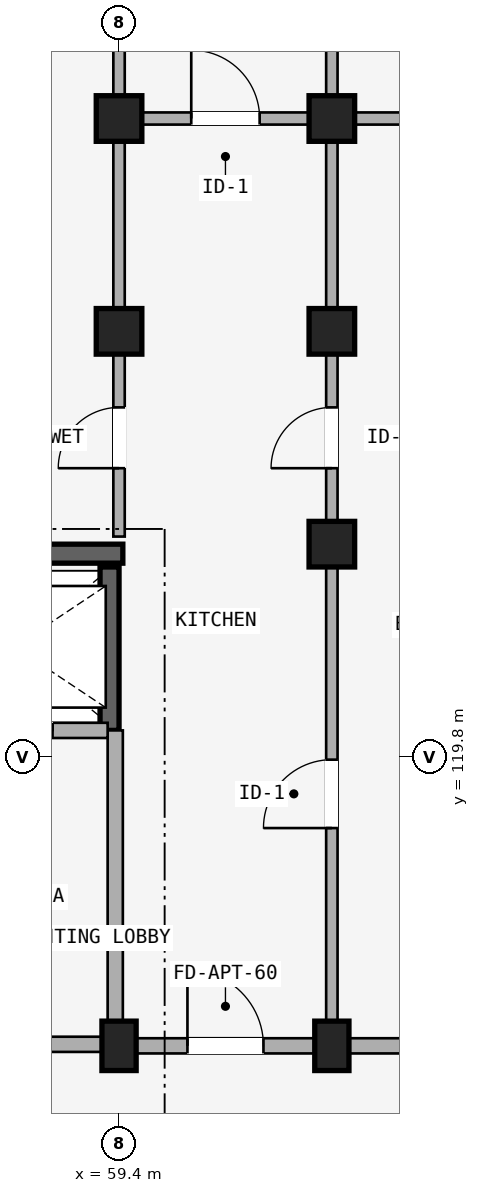
"""IFC4 building model, lengths in metres.
Left out: names, types, materials, properties, quantities, classifications, styles, units other than length and angle.
Written with IfcOpenShell. Run it as: python <this file> out.ifc"""

import sys

from ifc_helpers import new_model, si_unit, direction, frame, frame_2d, origin, origin_2d, place, context, subcontext, project, spatial, rectangle, extrude, element, fill, save


model = new_model("IFC4")
c1 = context("Model", 3, precision=1e-05, world=origin(), true_north=direction((0.0, 1.0)))
c2 = subcontext(c1, "Body", "Model", "MODEL_VIEW")
j1 = project(units=[si_unit("LENGTHUNIT", "METRE"), si_unit("PLANEANGLEUNIT", "RADIAN")], contexts=[c1])
p1 = place(None, origin())
s1 = spatial("IfcSite", under=j1, at=p1, CompositionType="ELEMENT")
p2 = place(p1, origin())
s2 = spatial("IfcBuilding", under=s1, at=p2, CompositionType="ELEMENT")
p3 = place(p2, frame((0.0, 0.0, 30.75)))
s3 = spatial("IfcBuildingStorey", under=s2, at=p3, CompositionType="ELEMENT", Elevation=30.75)
p4 = place(p3, frame((56.65, 122.475, 0.0), z_axis=(0.0, 0.0, 1.0), x_axis=(1.0, 0.0, 0.0)))
e1 = element("IfcWall", 1, at=p4, inside=s3, PredefinedType="SHEAR", context=c2, shape_type="SweptSolid", body=[
    extrude(rectangle(XDim=2.8, YDim=0.25, at=frame_2d((1.4, 0.0))), origin(), (0.0, 0.0, 1.0), 2.93),
])
p5 = place(p3, frame((59.275, 120.15, 0.0), z_axis=(0.0, 0.0, 1.0), x_axis=(0.0, 1.0, 0.0)))
e2 = element("IfcWall", 2, at=p5, inside=s3, PredefinedType="SHEAR", context=c2, shape_type="SweptSolid", body=[
    extrude(rectangle(XDim=2.15, YDim=0.25, at=frame_2d((1.075, 0.0))), origin(), (0.0, 0.0, 1.0), 2.93),
])
p6 = place(p3, frame((59.4, 116.0, 0.0), z_axis=(0.0, 0.0, 1.0), x_axis=(1.0, 0.0, 0.0)))
e3 = element("IfcColumn", 3, at=p6, inside=s3, PredefinedType="COLUMN", context=c2, shape_type="SweptSolid", body=[
    extrude(rectangle(XDim=0.45, YDim=0.65, at=origin_2d()), origin(), (0.0, 0.0, 1.0), 2.93),
])
for number, where, z_axis, x_axis in (
    (4, (59.4, 125.4, 0.0), (0.0, 0.0, 1.0), (1.0, 0.0, 0.0)),
    (5, (59.4, 128.2, 0.0), (0.0, 0.0, 1.0), (1.0, 0.0, 0.0)),
):
    element("IfcColumn", number, at=place(p3, frame(where, z_axis=z_axis, x_axis=x_axis)), inside=s3, PredefinedType="COLUMN", context=c2, shape_type="SweptSolid", body=[
        extrude(rectangle(XDim=0.6, YDim=0.6, at=origin_2d()), origin(), (0.0, 0.0, 1.0), 2.93),
    ])
p7 = place(p3, frame((62.2, 116.0, 0.0), z_axis=(0.0, 0.0, 1.0), x_axis=(1.0, 0.0, 0.0)))
e6 = element("IfcColumn", 6, at=p7, inside=s3, PredefinedType="COLUMN", context=c2, shape_type="SweptSolid", body=[
    extrude(rectangle(XDim=0.45, YDim=0.65, at=origin_2d()), origin(), (0.0, 0.0, 1.0), 2.93),
])
for number, where, z_axis, x_axis in (
    (7, (62.2, 122.6, 0.0), (0.0, 0.0, 1.0), (1.0, 0.0, 0.0)),
    (8, (62.2, 125.4, 0.0), (0.0, 0.0, 1.0), (1.0, 0.0, 0.0)),
    (9, (62.2, 128.2, 0.0), (0.0, 0.0, 1.0), (1.0, 0.0, 0.0)),
):
    element("IfcColumn", number, at=place(p3, frame(where, z_axis=z_axis, x_axis=x_axis)), inside=s3, PredefinedType="COLUMN", context=c2, shape_type="SweptSolid", body=[
        extrude(rectangle(XDim=0.6, YDim=0.6, at=origin_2d()), origin(), (0.0, 0.0, 1.0), 2.93),
    ])
p8 = place(p3, frame((53.7, 116.02, 0.0), z_axis=(0.0, 0.0, 1.0), x_axis=(1.0, 0.0, 0.0)))
e10 = element("IfcWall", 10, at=p8, inside=s3, PredefinedType="STANDARD", context=c2, shape_type="SweptSolid", body=[
    extrude(rectangle(XDim=5.65, YDim=0.2, at=frame_2d((2.825, 0.0))), origin(), (0.0, 0.0, 1.0), 2.372),
])
p9 = place(p8, frame((1.923, 0.0, 0.0)))
e11 = element("IfcOpeningElement", 11, at=p9, cuts=e10, PredefinedType="OPENING", context=c2, shape_type="SweptSolid", body=[
    extrude(rectangle(XDim=1.24, YDim=2.15, at=frame_2d((0.62, 1.075))), frame((0.0, 0.11, 0.0), z_axis=(0.0, -1.0, 0.0), x_axis=(1.0, 0.0, 0.0)), (0.0, 0.0, 1.0), 0.22),
])
p10 = place(p3, frame((59.35, 116.02, 0.0), z_axis=(0.0, 0.0, 1.0), x_axis=(0.0, 1.0, 0.0)))
e12 = element("IfcWall", 12, at=p10, inside=s3, PredefinedType="STANDARD", context=c2, shape_type="SweptSolid", body=[
    extrude(rectangle(XDim=4.13, YDim=0.2, at=frame_2d((2.065, 0.0))), origin(), (0.0, 0.0, 1.0), 2.372),
])
p11 = place(p3, frame((56.7, 120.15, 0.0), z_axis=(0.0, 0.0, 1.0), x_axis=(1.0, 0.0, 0.0)))
e13 = element("IfcWall", 13, at=p11, inside=s3, PredefinedType="STANDARD", context=c2, shape_type="SweptSolid", body=[
    extrude(rectangle(XDim=2.55, YDim=0.2, at=frame_2d((1.275, 0.0))), origin(), (0.0, 0.0, 1.0), 2.372),
])
p12 = place(p11, frame((0.725, 0.0, 0.0)))
e14 = element("IfcOpeningElement", 14, at=p12, cuts=e13, PredefinedType="OPENING", context=c2, shape_type="SweptSolid", body=[
    extrude(rectangle(XDim=1.1, YDim=2.15, at=frame_2d((0.55, 1.075))), frame((0.0, 0.11, 0.0), z_axis=(0.0, -1.0, 0.0), x_axis=(1.0, 0.0, 0.0)), (0.0, 0.0, 1.0), 0.22),
])
p13 = place(p3, frame((59.4, 116.0, 0.0), z_axis=(0.0, 0.0, 1.0), x_axis=(1.0, 0.0, 0.0)))
e15 = element("IfcWall", 15, at=p13, inside=s3, PredefinedType="STANDARD", context=c2, shape_type="SweptSolid", body=[
    extrude(rectangle(XDim=2.8, YDim=0.2, at=frame_2d((1.4, 0.0))), origin(), (0.0, 0.0, 1.0), 2.372),
])
p14 = place(p13, frame((0.9, 0.0, 0.0)))
e16 = element("IfcOpeningElement", 16, at=p14, cuts=e15, PredefinedType="OPENING", context=c2, shape_type="SweptSolid", body=[
    extrude(rectangle(XDim=1.0, YDim=2.15, at=frame_2d((0.5, 1.075))), frame((0.0, 0.11, 0.0), z_axis=(0.0, -1.0, 0.0), x_axis=(1.0, 0.0, 0.0)), (0.0, 0.0, 1.0), 0.22),
])
p15 = place(p3, frame((59.48, 128.2, 0.0), z_axis=(0.0, 0.0, 1.0), x_axis=(1.0, 0.0, 0.0)))
e17 = element("IfcWall", 17, at=p15, inside=s3, PredefinedType="PLUMBINGWALL", context=c2, shape_type="SweptSolid", body=[
    extrude(rectangle(XDim=2.64, YDim=0.16, at=frame_2d((1.32, 0.0))), origin(), (0.0, 0.0, 1.0), 2.372),
])
p16 = place(p15, frame((0.87, 0.0, 0.0)))
e18 = element("IfcOpeningElement", 18, at=p16, cuts=e17, PredefinedType="OPENING", context=c2, shape_type="SweptSolid", body=[
    extrude(rectangle(XDim=0.9, YDim=2.1, at=frame_2d((0.45, 1.05))), frame((0.0, 0.09, 0.0), z_axis=(0.0, -1.0, 0.0), x_axis=(1.0, 0.0, 0.0)), (0.0, 0.0, 1.0), 0.18),
])
p17 = place(p3, frame((62.2, 116.0, 0.0), z_axis=(0.0, 0.0, 1.0), x_axis=(1.0, 0.0, 0.0)))
e19 = element("IfcWall", 19, at=p17, inside=s3, PredefinedType="STANDARD", context=c2, shape_type="SweptSolid", body=[
    extrude(rectangle(XDim=2.8, YDim=0.2, at=frame_2d((1.4, 0.0))), origin(), (0.0, 0.0, 1.0), 2.372),
])
p18 = place(p3, frame((62.28, 128.2, 0.0), z_axis=(0.0, 0.0, 1.0), x_axis=(1.0, 0.0, 0.0)))
e20 = element("IfcWall", 20, at=p18, inside=s3, PredefinedType="PLUMBINGWALL", context=c2, shape_type="SweptSolid", body=[
    extrude(rectangle(XDim=2.64, YDim=0.16, at=frame_2d((1.32, 0.0))), origin(), (0.0, 0.0, 1.0), 2.372),
])
p19 = place(p18, frame((0.92, 0.0, 0.0)))
e21 = element("IfcOpeningElement", 21, at=p19, cuts=e20, PredefinedType="OPENING", context=c2, shape_type="SweptSolid", body=[
    extrude(rectangle(XDim=0.8, YDim=2.1, at=frame_2d((0.4, 1.05))), frame((0.0, 0.09, 0.0), z_axis=(0.0, -1.0, 0.0), x_axis=(1.0, 0.0, 0.0)), (0.0, 0.0, 1.0), 0.18),
])
p20 = place(p3, frame((59.4, 122.7, 0.0), z_axis=(0.0, 0.0, 1.0), x_axis=(0.0, 1.0, 0.0)))
e22 = element("IfcWall", 22, at=p20, inside=s3, PredefinedType="PARTITIONING", context=c2, shape_type="SweptSolid", body=[
    extrude(rectangle(XDim=10.82, YDim=0.15, at=frame_2d((5.41, 0.0))), origin(), (0.0, 0.0, 1.0), 2.372),
])
p21 = place(p20, frame((0.899, 0.0, 0.0)))
e23 = element("IfcOpeningElement", 23, at=p21, cuts=e22, PredefinedType="OPENING", context=c2, shape_type="SweptSolid", body=[
    extrude(rectangle(XDim=0.8, YDim=2.1, at=frame_2d((0.4, 1.05))), frame((0.0, 0.085, 0.0), z_axis=(0.0, -1.0, 0.0), x_axis=(1.0, 0.0, 0.0)), (0.0, 0.0, 1.0), 0.17),
])
p22 = place(p3, frame((62.2, 116.05, 0.0), z_axis=(0.0, 0.0, 1.0), x_axis=(0.0, 1.0, 0.0)))
e24 = element("IfcWall", 24, at=p22, inside=s3, PredefinedType="PARTITIONING", context=c2, shape_type="SweptSolid", body=[
    extrude(rectangle(XDim=6.53, YDim=0.15, at=frame_2d((3.265, 0.0))), origin(), (0.0, 0.0, 1.0), 2.372),
])
p23 = place(p22, frame((2.815, 0.0, 0.0)))
e25 = element("IfcOpeningElement", 25, at=p23, cuts=e24, PredefinedType="OPENING", context=c2, shape_type="SweptSolid", body=[
    extrude(rectangle(XDim=0.9, YDim=2.1, at=frame_2d((0.45, 1.05))), frame((0.0, 0.085, 0.0), z_axis=(0.0, -1.0, 0.0), x_axis=(1.0, 0.0, 0.0)), (0.0, 0.0, 1.0), 0.17),
])
p24 = place(p3, frame((62.2, 122.7, 0.0), z_axis=(0.0, 0.0, 1.0), x_axis=(0.0, 1.0, 0.0)))
e26 = element("IfcWall", 26, at=p24, inside=s3, PredefinedType="PARTITIONING", context=c2, shape_type="SweptSolid", body=[
    extrude(rectangle(XDim=10.82, YDim=0.15, at=frame_2d((5.41, 0.0))), origin(), (0.0, 0.0, 1.0), 2.372),
])
p25 = place(p24, frame((0.899, 0.0, 0.0)))
e27 = element("IfcOpeningElement", 27, at=p25, cuts=e26, PredefinedType="OPENING", context=c2, shape_type="SweptSolid", body=[
    extrude(rectangle(XDim=0.8, YDim=2.1, at=frame_2d((0.4, 1.05))), frame((0.0, 0.085, 0.0), z_axis=(0.0, -1.0, 0.0), x_axis=(1.0, 0.0, 0.0)), (0.0, 0.0, 1.0), 0.17),
])
p26 = place(p12, origin())
e28 = element("IfcDoor", 28, at=p26, inside=s3, OperationType="SLIDING_TO_LEFT", PredefinedType="DOOR", context=c2, shape_type="SweptSolid", body=[
    extrude(rectangle(XDim=1.1, YDim=2.15, at=frame_2d((0.55, 1.075))), frame((0.0, 0.025, 0.0), z_axis=(0.0, -1.0, 0.0), x_axis=(1.0, 0.0, 0.0)), (0.0, 0.0, 1.0), 0.05),
])
fill(e14, e28)
p27 = place(p16, origin())
e29 = element("IfcDoor", 29, at=p27, inside=s3, OperationType="SINGLE_SWING_LEFT", PredefinedType="DOOR", context=c2, shape_type="SweptSolid", body=[
    extrude(rectangle(XDim=0.9, YDim=2.1, at=frame_2d((0.45, 1.05))), frame((0.0, 0.025, 0.0), z_axis=(0.0, -1.0, 0.0), x_axis=(1.0, 0.0, 0.0)), (0.0, 0.0, 1.0), 0.05),
])
fill(e18, e29)
p28 = place(p14, frame((1.0, 0.0, 0.0), z_axis=(0.0, 0.0, 1.0), x_axis=(-1.0, 0.0, 0.0)))
e30 = element("IfcDoor", 30, at=p28, inside=s3, OperationType="SINGLE_SWING_RIGHT", PredefinedType="DOOR", context=c2, shape_type="SweptSolid", body=[
    extrude(rectangle(XDim=1.0, YDim=2.15, at=frame_2d((0.5, 1.075))), frame((0.0, 0.025, 0.0), z_axis=(0.0, -1.0, 0.0), x_axis=(1.0, 0.0, 0.0)), (0.0, 0.0, 1.0), 0.05),
])
fill(e16, e30)
p29 = place(p21, frame((0.8, 0.0, 0.0), z_axis=(0.0, 0.0, 1.0), x_axis=(-1.0, 0.0, 0.0)))
e31 = element("IfcDoor", 31, at=p29, inside=s3, OperationType="SINGLE_SWING_RIGHT", PredefinedType="DOOR", context=c2, shape_type="SweptSolid", body=[
    extrude(rectangle(XDim=0.8, YDim=2.1, at=frame_2d((0.4, 1.05))), frame((0.0, 0.025, 0.0), z_axis=(0.0, -1.0, 0.0), x_axis=(1.0, 0.0, 0.0)), (0.0, 0.0, 1.0), 0.05),
])
fill(e23, e31)
p30 = place(p23, frame((0.9, 0.0, 0.0), z_axis=(0.0, 0.0, 1.0), x_axis=(-1.0, 0.0, 0.0)))
e32 = element("IfcDoor", 32, at=p30, inside=s3, OperationType="SINGLE_SWING_RIGHT", PredefinedType="DOOR", context=c2, shape_type="SweptSolid", body=[
    extrude(rectangle(XDim=0.9, YDim=2.1, at=frame_2d((0.45, 1.05))), frame((0.0, 0.025, 0.0), z_axis=(0.0, -1.0, 0.0), x_axis=(1.0, 0.0, 0.0)), (0.0, 0.0, 1.0), 0.05),
])
fill(e25, e32)
p31 = place(p25, origin())
e33 = element("IfcDoor", 33, at=p31, inside=s3, OperationType="SINGLE_SWING_LEFT", PredefinedType="DOOR", context=c2, shape_type="SweptSolid", body=[
    extrude(rectangle(XDim=0.8, YDim=2.1, at=frame_2d((0.4, 1.05))), frame((0.0, 0.025, 0.0), z_axis=(0.0, -1.0, 0.0), x_axis=(1.0, 0.0, 0.0)), (0.0, 0.0, 1.0), 0.05),
])
fill(e27, e33)
save(model, sys.argv[1])
